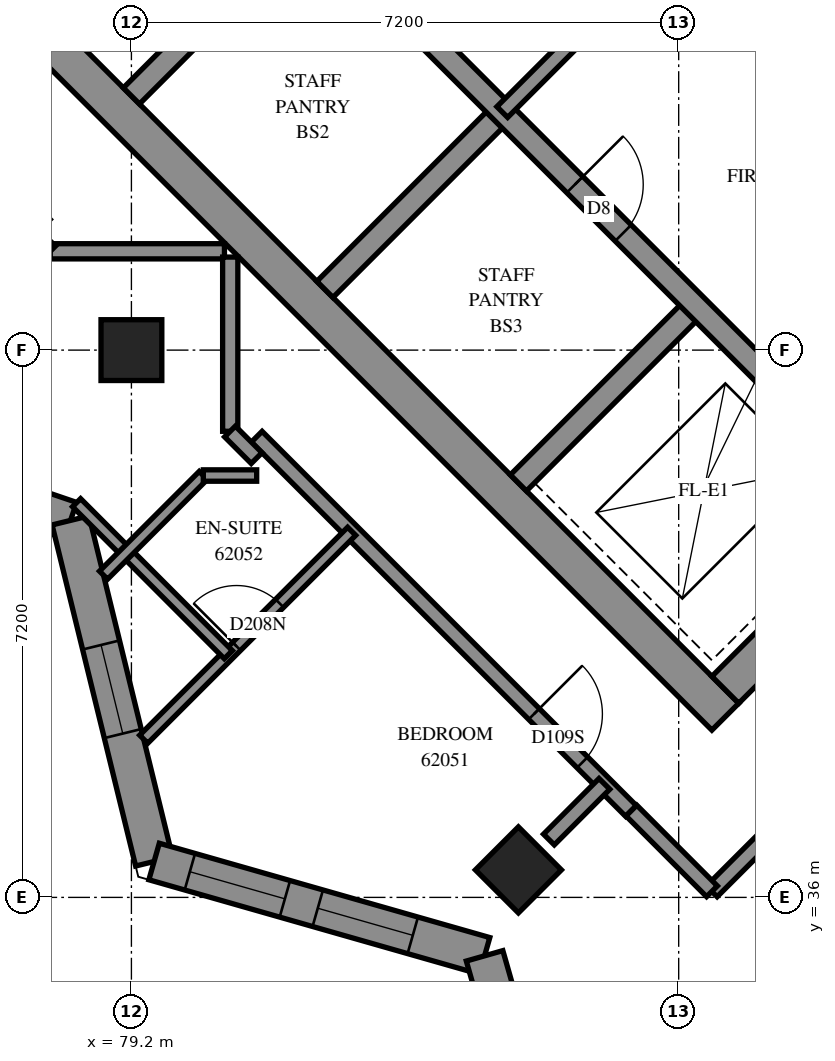
"""IFC4 building model, lengths in metres.
Left out: names, types, materials, properties, quantities, classifications, styles, units other than length and angle.
Written with IfcOpenShell. Run it as: python <this file> out.ifc"""

import sys

from ifc_helpers import new_model, si_unit, direction, frame, frame_2d, origin, origin_2d, place, context, subcontext, project, spatial, polyline, rectangle, outline, extrude, element, fill, save


model = new_model("IFC4")
c1 = context("Model", 3, precision=1e-05, world=origin(), true_north=direction((0.0, 1.0)))
c2 = subcontext(c1, "Body", "Model", "MODEL_VIEW")
j1 = project(units=[si_unit("LENGTHUNIT", "METRE"), si_unit("PLANEANGLEUNIT", "RADIAN")], contexts=[c1])
p1 = place(None, origin())
s1 = spatial("IfcSite", under=j1, at=p1, CompositionType="ELEMENT")
p2 = place(p1, origin())
s2 = spatial("IfcBuilding", under=s1, at=p2, CompositionType="ELEMENT")
p3 = place(p2, frame((0.0, 0.0, 227.0)))
s3 = spatial("IfcBuildingStorey", under=s2, at=p3, CompositionType="ELEMENT", Elevation=227.0)
for number, where, z_axis, x_axis in (
    (1, (79.2, 43.2, 0.0), (0.0, 0.0, 1.0), (1.0, 0.0, 0.0)),
    (2, (84.291, 36.362, 0.0), (0.0, 0.0, 1.0), (0.707, -0.707, 0.0)),
):
    element("IfcColumn", number, at=place(p3, frame(where, z_axis=z_axis, x_axis=x_axis)), inside=s3, PredefinedType="COLUMN", context=c2, shape_type="SweptSolid", body=[
        extrude(rectangle(XDim=0.8, YDim=0.8, at=origin_2d()), origin(), (0.0, 0.0, 1.0), 3.1),
    ])
p4 = place(p3, frame((76.124, 49.267, -0.3), z_axis=(0.0, 0.0, 1.0), x_axis=(0.7071067812, -0.7071067812, 0.0)))
e3 = element("IfcWall", 3, at=p4, inside=s3, PredefinedType="SHEAR", context=c2, shape_type="SweptSolid", body=[
    extrude(rectangle(XDim=15.4, YDim=0.5, at=frame_2d((7.7, 0.0))), origin(), (0.0, 0.0, 1.0), 2.7),
])
p5 = place(p3, frame((87.013, 38.731, -0.3), z_axis=(0.0, 0.0, 1.0), x_axis=(0.7071067812, 0.7071067812, 0.0)))
e4 = element("IfcWall", 4, at=p5, inside=s3, PredefinedType="SHEAR", context=c2, shape_type="SweptSolid", body=[
    extrude(rectangle(XDim=14.4, YDim=0.5, at=frame_2d((7.2, 0.0))), origin(), (0.0, 0.0, 1.0), 2.7),
])
p6 = place(p5, frame((4.55, 0.0, 0.3)))
e5 = element("IfcOpeningElement", 5, at=p6, cuts=e4, PredefinedType="OPENING", context=c2, shape_type="SweptSolid", body=[
    extrude(rectangle(XDim=1.1, YDim=2.1, at=frame_2d((0.55, 1.05))), frame((0.0, 0.26, 0.0), z_axis=(0.0, -1.0, 0.0), x_axis=(1.0, 0.0, 0.0)), (0.0, 0.0, 1.0), 0.52),
])
p7 = place(p5, frame((11.35, 0.0, 0.3)))
e6 = element("IfcOpeningElement", 6, at=p7, cuts=e4, PredefinedType="OPENING", context=c2, shape_type="SweptSolid", body=[
    extrude(rectangle(XDim=1.1, YDim=2.1, at=frame_2d((0.55, 1.05))), frame((0.0, 0.26, 0.0), z_axis=(0.0, -1.0, 0.0), x_axis=(1.0, 0.0, 0.0)), (0.0, 0.0, 1.0), 0.52),
])
p8 = place(p3, frame((79.2, 46.544, 0.0), z_axis=(0.0, 0.0, 1.0), x_axis=(0.7071219326, 0.7070916295, 0.0)))
e7 = element("IfcWall", 7, at=p8, inside=s3, PredefinedType="SOLIDWALL", context=c2, shape_type="SweptSolid", body=[
    extrude(rectangle(XDim=3.3, YDim=0.3, at=frame_2d((1.65, 0.0))), origin(), (0.0, 0.0, 1.0), 3.1),
])
for number, where, z_axis, x_axis in (
    (8, (81.746, 43.999, 0.0), (0.0, 0.0, 1.0), (0.707, 0.707, 0.0)),
    (9, (84.291, 41.453, 0.0), (0.0, 0.0, 1.0), (0.707, 0.707, 0.0)),
):
    element("IfcWall", number, at=place(p3, frame(where, z_axis=z_axis, x_axis=x_axis)), inside=s3, PredefinedType="SOLIDWALL", context=c2, shape_type="SweptSolid", body=[
        extrude(rectangle(XDim=3.3, YDim=0.3, at=frame_2d((1.65, 0.0))), origin(), (0.0, 0.0, 1.0), 3.1),
    ])
p9 = place(p3, frame((78.988, 51.423, 0.0), z_axis=(0.0, 0.0, 1.0), x_axis=(0.7071067812, -0.7071067812, 0.0)))
e10 = element("IfcWall", 10, at=p9, inside=s3, PredefinedType="SOLIDWALL", context=c2, shape_type="SweptSolid", body=[
    extrude(rectangle(XDim=14.4, YDim=0.3, at=frame_2d((7.2, 0.0))), origin(), (0.0, 0.0, 1.0), 3.1),
])
p10 = place(p9, frame((1.35, 0.0, 0.0)))
e11 = element("IfcOpeningElement", 11, at=p10, cuts=e10, PredefinedType="OPENING", context=c2, shape_type="SweptSolid", body=[
    extrude(rectangle(XDim=0.9, YDim=2.1, at=frame_2d((0.45, 1.05))), frame((0.0, 0.16, 0.0), z_axis=(0.0, -1.0, 0.0), x_axis=(1.0, 0.0, 0.0)), (0.0, 0.0, 1.0), 0.32),
])
p11 = place(p9, frame((4.95, 0.0, 0.0)))
e12 = element("IfcOpeningElement", 12, at=p11, cuts=e10, PredefinedType="OPENING", context=c2, shape_type="SweptSolid", body=[
    extrude(rectangle(XDim=0.9, YDim=2.1, at=frame_2d((0.45, 1.05))), frame((0.0, 0.16, 0.0), z_axis=(0.0, -1.0, 0.0), x_axis=(1.0, 0.0, 0.0)), (0.0, 0.0, 1.0), 0.32),
])
p12 = place(p9, frame((8.55, 0.0, 0.0)))
e13 = element("IfcOpeningElement", 13, at=p12, cuts=e10, PredefinedType="OPENING", context=c2, shape_type="SweptSolid", body=[
    extrude(rectangle(XDim=0.9, YDim=2.1, at=frame_2d((0.45, 1.05))), frame((0.0, 0.16, 0.0), z_axis=(0.0, -1.0, 0.0), x_axis=(1.0, 0.0, 0.0)), (0.0, 0.0, 1.0), 0.32),
])
p13 = place(p9, frame((12.05, 0.0, 0.0)))
e14 = element("IfcOpeningElement", 14, at=p13, cuts=e10, PredefinedType="OPENING", context=c2, shape_type="SweptSolid", body=[
    extrude(rectangle(XDim=1.1, YDim=2.1, at=frame_2d((0.55, 1.05))), frame((0.0, 0.16, 0.0), z_axis=(0.0, -1.0, 0.0), x_axis=(1.0, 0.0, 0.0)), (0.0, 0.0, 1.0), 0.32),
])
p14 = place(p3, frame((81.534, 53.969, 0.0), z_axis=(0.0, 0.0, 1.0), x_axis=(0.707103309, -0.7071102534, 0.0)))
e15 = element("IfcWall", 15, at=p14, inside=s3, PredefinedType="SOLIDWALL", context=c2, shape_type="SweptSolid", body=[
    extrude(rectangle(XDim=14.4, YDim=0.3, at=frame_2d((7.2, 0.0))), origin(), (0.0, 0.0, 1.0), 3.1),
])
p15 = place(p14, frame((1.25, 0.0, 0.0)))
e16 = element("IfcOpeningElement", 16, at=p15, cuts=e15, PredefinedType="OPENING", context=c2, shape_type="SweptSolid", body=[
    extrude(rectangle(XDim=1.1, YDim=2.1, at=frame_2d((0.55, 1.05))), frame((0.0, 0.16, 0.0), z_axis=(0.0, -1.0, 0.0), x_axis=(1.0, 0.0, 0.0)), (0.0, 0.0, 1.0), 0.32),
])
p16 = place(p14, frame((4.85, 0.0, 0.0)))
e17 = element("IfcOpeningElement", 17, at=p16, cuts=e15, PredefinedType="OPENING", context=c2, shape_type="SweptSolid", body=[
    extrude(rectangle(XDim=1.1, YDim=2.1, at=frame_2d((0.55, 1.05))), frame((0.0, 0.16, 0.0), z_axis=(0.0, -1.0, 0.0), x_axis=(1.0, 0.0, 0.0)), (0.0, 0.0, 1.0), 0.32),
])
p17 = place(p14, frame((8.45, 0.0, 0.0)))
e18 = element("IfcOpeningElement", 18, at=p17, cuts=e15, PredefinedType="OPENING", context=c2, shape_type="SweptSolid", body=[
    extrude(rectangle(XDim=1.1, YDim=2.1, at=frame_2d((0.55, 1.05))), frame((0.0, 0.16, 0.0), z_axis=(0.0, -1.0, 0.0), x_axis=(1.0, 0.0, 0.0)), (0.0, 0.0, 1.0), 0.32),
])
p18 = place(p14, frame((12.05, 0.0, 0.0)))
e19 = element("IfcOpeningElement", 19, at=p18, cuts=e15, PredefinedType="OPENING", context=c2, shape_type="SweptSolid", body=[
    extrude(rectangle(XDim=1.1, YDim=2.1, at=frame_2d((0.55, 1.05))), frame((0.0, 0.16, 0.0), z_axis=(0.0, -1.0, 0.0), x_axis=(1.0, 0.0, 0.0)), (0.0, 0.0, 1.0), 0.32),
])
p19 = place(p3, frame((74.585, 42.257, 0.0), z_axis=(0.0, 0.0, 1.0), x_axis=(0.9466888904, -0.3221492585, 0.0)))
e20 = element("IfcWall", 20, at=p19, inside=s3, PredefinedType="SOLIDWALL", context=c2, shape_type="SweptSolid", body=[
    extrude(outline(polyline([(0.064, -0.25), (3.892, -0.25), (4.166, 0.25), (-0.064, 0.25), (0.064, -0.25)])), origin(), (0.0, 0.0, 1.0), 3.1),
])
p20 = place(p19, frame((1.7, 0.0, 0.45)))
e21 = element("IfcOpeningElement", 21, at=p20, cuts=e20, PredefinedType="OPENING", context=c2, shape_type="SweptSolid", body=[
    extrude(rectangle(XDim=1.2, YDim=2.5, at=frame_2d((0.6, 1.25))), frame((0.0, 0.26, 0.0), z_axis=(0.0, -1.0, 0.0), x_axis=(1.0, 0.0, 0.0)), (0.0, 0.0, 1.0), 0.52),
])
p21 = place(p3, frame((78.399, 40.959, 0.0), z_axis=(0.0, 0.0, 1.0), x_axis=(0.2379595757, -0.9712750591, 0.0)))
e22 = element("IfcWall", 22, at=p21, inside=s3, PredefinedType="SOLIDWALL", context=c2, shape_type="SweptSolid", body=[
    extrude(outline(polyline([(0.137, -0.25), (4.765, -0.25), (4.475, 0.25), (-0.137, 0.25), (0.137, -0.25)])), origin(), (0.0, 0.0, 1.0), 3.1),
])
p22 = place(p21, frame((1.687, 0.0, 0.45)))
e23 = element("IfcOpeningElement", 23, at=p22, cuts=e22, PredefinedType="OPENING", context=c2, shape_type="SweptSolid", body=[
    extrude(rectangle(XDim=1.2, YDim=2.5, at=frame_2d((0.6, 1.25))), frame((0.0, 0.26, 0.0), z_axis=(0.0, -1.0, 0.0), x_axis=(1.0, 0.0, 0.0)), (0.0, 0.0, 1.0), 0.52),
])
p23 = place(p3, frame((79.499, 36.472, 0.0), z_axis=(0.0, 0.0, 1.0), x_axis=(0.9615973563, -0.2744640675, 0.0)))
e24 = element("IfcWall", 24, at=p23, inside=s3, PredefinedType="SOLIDWALL", context=c2, shape_type="SweptSolid", body=[
    extrude(outline(polyline([(-0.145, -0.25), (4.383, -0.25), (4.661, 0.25), (0.145, 0.25), (-0.145, -0.25)])), origin(), (0.0, 0.0, 1.0), 3.1),
])
p24 = place(p23, frame((0.489, 0.0, 0.45)))
e25 = element("IfcOpeningElement", 25, at=p24, cuts=e24, PredefinedType="OPENING", context=c2, shape_type="SweptSolid", body=[
    extrude(rectangle(XDim=1.3, YDim=2.5, at=frame_2d((0.65, 1.25))), frame((0.0, 0.26, 0.0), z_axis=(0.0, -1.0, 0.0), x_axis=(1.0, 0.0, 0.0)), (0.0, 0.0, 1.0), 0.52),
])
p25 = place(p23, frame((2.239, 0.0, 0.45)))
e26 = element("IfcOpeningElement", 26, at=p25, cuts=e24, PredefinedType="OPENING", context=c2, shape_type="SweptSolid", body=[
    extrude(rectangle(XDim=1.3, YDim=2.5, at=frame_2d((0.65, 1.25))), frame((0.0, 0.26, 0.0), z_axis=(0.0, -1.0, 0.0), x_axis=(1.0, 0.0, 0.0)), (0.0, 0.0, 1.0), 0.52),
])
p26 = place(p3, frame((83.846, 35.231, 0.0), z_axis=(0.0, 0.0, 1.0), x_axis=(0.2744640675, -0.9615973563, 0.0)))
e27 = element("IfcWall", 27, at=p26, inside=s3, PredefinedType="SOLIDWALL", context=c2, shape_type="SweptSolid", body=[
    extrude(outline(polyline([(0.139, -0.25), (4.667, -0.25), (4.376, 0.25), (-0.139, 0.25), (0.139, -0.25)])), origin(), (0.0, 0.0, 1.0), 3.1),
])
p27 = place(p26, frame((0.972, 0.0, 0.45)))
e28 = element("IfcOpeningElement", 28, at=p27, cuts=e27, PredefinedType="OPENING", context=c2, shape_type="SweptSolid", body=[
    extrude(rectangle(XDim=1.2, YDim=2.5, at=frame_2d((0.6, 1.25))), frame((0.0, 0.26, 0.0), z_axis=(0.0, -1.0, 0.0), x_axis=(1.0, 0.0, 0.0)), (0.0, 0.0, 1.0), 0.52),
])
p28 = place(p3, frame((84.079, 46.332, 0.0), z_axis=(0.0, 0.0, 1.0), x_axis=(0.7071067812, 0.7071067812, 0.0)))
e29 = element("IfcWall", 29, at=p28, inside=s3, PredefinedType="PARTITIONING", context=c2, shape_type="SweptSolid", body=[
    extrude(rectangle(XDim=3.6, YDim=0.2, at=frame_2d((1.8, 0.0))), origin(), (0.0, 0.0, 1.0), 3.1),
])
p29 = place(p3, frame((85.026, 32.008, 0.0), z_axis=(0.0, 0.0, 1.0), x_axis=(0.7071030933, 0.707110469, 0.0)))
e30 = element("IfcWall", 30, at=p29, inside=s3, PredefinedType="PARTITIONING", context=c2, shape_type="SweptSolid", body=[
    extrude(rectangle(XDim=13.558, YDim=0.2, at=frame_2d((6.779, 0.0))), origin(), (0.0, 0.0, 1.0), 3.1),
])
p30 = place(p3, frame((86.835, 36.079, 0.0), z_axis=(0.0, 0.0, 1.0), x_axis=(0.7071067812, 0.7071067812, 0.0)))
e31 = element("IfcWall", 31, at=p30, inside=s3, PredefinedType="PARTITIONING", context=c2, shape_type="SweptSolid", body=[
    extrude(rectangle(XDim=9.402, YDim=0.2, at=frame_2d((4.701, 0.0))), origin(), (0.0, 0.0, 1.0), 3.1),
])
p31 = place(p3, frame((80.849, 42.061, 0.0), z_axis=(0.0, 0.0, 1.0), x_axis=(0.7071067812, -0.7071067812, 0.0)))
e32 = element("IfcWall", 32, at=p31, inside=s3, PredefinedType="PARTITIONING", context=c2, shape_type="SweptSolid", body=[
    extrude(rectangle(XDim=6.964, YDim=0.2, at=frame_2d((3.482, 0.0))), origin(), (0.0, 0.0, 1.0), 3.1),
])
p32 = place(p31, frame((5.159, 0.0, 0.0)))
e33 = element("IfcOpeningElement", 33, at=p32, cuts=e32, PredefinedType="OPENING", context=c2, shape_type="SweptSolid", body=[
    extrude(rectangle(XDim=0.9, YDim=2.1, at=frame_2d((0.45, 1.05))), frame((0.0, 0.11, 0.0), z_axis=(0.0, -1.0, 0.0), x_axis=(1.0, 0.0, 0.0)), (0.0, 0.0, 1.0), 0.22),
])
p33 = place(p3, frame((79.362, 38.081, 0.0), z_axis=(0.0, 0.0, 1.0), x_axis=(0.7071067812, 0.7071067812, 0.0)))
e34 = element("IfcWall", 34, at=p33, inside=s3, PredefinedType="PARTITIONING", context=c2, shape_type="SweptSolid", body=[
    extrude(rectangle(XDim=3.869, YDim=0.15, at=frame_2d((1.935, 0.0))), origin(), (0.0, 0.0, 1.0), 3.1),
])
p34 = place(p33, frame((1.728, 0.0, 0.0)))
e35 = element("IfcOpeningElement", 35, at=p34, cuts=e34, PredefinedType="OPENING", context=c2, shape_type="SweptSolid", body=[
    extrude(rectangle(XDim=0.8, YDim=2.1, at=frame_2d((0.4, 1.05))), frame((0.0, 0.085, 0.0), z_axis=(0.0, -1.0, 0.0), x_axis=(1.0, 0.0, 0.0)), (0.0, 0.0, 1.0), 0.17),
])
p35 = place(p3, frame((78.478, 41.193, 0.0), z_axis=(0.0, 0.0, 1.0), x_axis=(0.7065934681, -0.7076197219, 0.0)))
e36 = element("IfcWall", 36, at=p35, inside=s3, PredefinedType="PARTITIONING", context=c2, shape_type="SweptSolid", body=[
    extrude(rectangle(XDim=2.826, YDim=0.15, at=frame_2d((1.413, 0.0))), origin(), (0.0, 0.0, 1.0), 3.1),
])
for number, where, z_axis, x_axis in (
    (37, (78.132, 44.5, 0.0), (0.0, 0.0, 1.0), (1.0, 0.0, 0.0)),
    (38, (80.5, 42.132, 0.0), (0.0, 0.0, 1.0), (0.0, 1.0, 0.0)),
):
    element("IfcWall", number, at=place(p3, frame(where, z_axis=z_axis, x_axis=x_axis)), inside=s3, PredefinedType="PARTITIONING", context=c2, shape_type="SweptSolid", body=[
        extrude(rectangle(XDim=2.292, YDim=0.2, at=frame_2d((1.146, 0.0))), origin(), (0.0, 0.0, 1.0), 3.1),
    ])
p36 = place(p3, frame((78.833, 40.239, 0.0), z_axis=(0.0, 0.0, 1.0), x_axis=(0.707079832, 0.7071337294, 0.0)))
e39 = element("IfcWall", 39, at=p36, inside=s3, PredefinedType="PARTITIONING", context=c2, shape_type="SweptSolid", body=[
    extrude(rectangle(XDim=1.855, YDim=0.15, at=frame_2d((0.928, 0.0))), origin(), (0.0, 0.0, 1.0), 3.1),
])
p37 = place(p3, frame((85.778, 37.142, 0.0), z_axis=(0.0, 0.0, 1.0), x_axis=(0.7064400143, -0.70777292, 0.0)))
e40 = element("IfcWall", 40, at=p37, inside=s3, PredefinedType="PARTITIONING", context=c2, shape_type="SweptSolid", body=[
    extrude(rectangle(XDim=1.5, YDim=0.2, at=frame_2d((0.75, 0.0))), origin(), (0.0, 0.0, 1.0), 3.1),
])
p38 = place(p3, frame((84.693, 36.761, 0.0), z_axis=(0.0, 0.0, 1.0), x_axis=(0.7061388061, 0.708073433, 0.0)))
e41 = element("IfcWall", 41, at=p38, inside=s3, PredefinedType="PARTITIONING", context=c2, shape_type="SweptSolid", body=[
    extrude(rectangle(XDim=1.034, YDim=0.2, at=frame_2d((0.517, 0.0))), origin(), (0.0, 0.0, 1.0), 3.1),
])
p39 = place(p3, frame((80.146, 41.55, 0.0), z_axis=(0.0, 0.0, 1.0), x_axis=(1.0, 0.0, 0.0)))
e42 = element("IfcWall", 42, at=p39, inside=s3, PredefinedType="PARTITIONING", context=c2, shape_type="SweptSolid", body=[
    extrude(rectangle(XDim=0.702, YDim=0.15, at=frame_2d((0.351, 0.0))), origin(), (0.0, 0.0, 1.0), 3.1),
])
for number, where, z_axis, x_axis in (
    (43, (77.779, 44.847, 0.0), (0.0, 0.0, 1.0), (0.707, -0.707, 0.0)),
    (44, (80.497, 42.129, 0.0), (0.0, 0.0, 1.0), (0.707, -0.707, 0.0)),
):
    element("IfcWall", number, at=place(p3, frame(where, z_axis=z_axis, x_axis=x_axis)), inside=s3, PredefinedType="PARTITIONING", context=c2, shape_type="SweptSolid", body=[
        extrude(rectangle(XDim=0.495, YDim=0.2, at=frame_2d((0.247, 0.0))), origin(), (0.0, 0.0, 1.0), 3.1),
    ])
p40 = place(p22, origin())
e45 = element("IfcWindow", 45, at=p40, inside=s3, PartitioningType="SINGLE_PANEL", PredefinedType="WINDOW", context=c2, shape_type="SweptSolid", body=[
    extrude(rectangle(XDim=1.2, YDim=2.5, at=frame_2d((0.6, 1.25))), frame((0.0, 0.18, 0.0), z_axis=(0.0, -1.0, 0.0), x_axis=(1.0, 0.0, 0.0)), (0.0, 0.0, 1.0), 0.06),
])
fill(e23, e45)
p41 = place(p24, origin())
e46 = element("IfcWindow", 46, at=p41, inside=s3, PartitioningType="SINGLE_PANEL", PredefinedType="WINDOW", context=c2, shape_type="SweptSolid", body=[
    extrude(rectangle(XDim=1.3, YDim=2.5, at=frame_2d((0.65, 1.25))), frame((0.0, 0.18, 0.0), z_axis=(0.0, -1.0, 0.0), x_axis=(1.0, 0.0, 0.0)), (0.0, 0.0, 1.0), 0.06),
])
fill(e25, e46)
p42 = place(p25, origin())
e47 = element("IfcWindow", 47, at=p42, inside=s3, PartitioningType="SINGLE_PANEL", PredefinedType="WINDOW", context=c2, shape_type="SweptSolid", body=[
    extrude(rectangle(XDim=1.3, YDim=2.5, at=frame_2d((0.65, 1.25))), frame((0.0, 0.18, 0.0), z_axis=(0.0, -1.0, 0.0), x_axis=(1.0, 0.0, 0.0)), (0.0, 0.0, 1.0), 0.06),
])
fill(e26, e47)
p43 = place(p12, origin())
e48 = element("IfcDoor", 48, at=p43, inside=s3, OperationType="SINGLE_SWING_LEFT", PredefinedType="DOOR", context=c2, shape_type="SweptSolid", body=[
    extrude(rectangle(XDim=0.9, YDim=2.1, at=frame_2d((0.45, 1.05))), frame((0.0, 0.025, 0.0), z_axis=(0.0, -1.0, 0.0), x_axis=(1.0, 0.0, 0.0)), (0.0, 0.0, 1.0), 0.05),
])
fill(e13, e48)
p44 = place(p32, origin())
e49 = element("IfcDoor", 49, at=p44, inside=s3, OperationType="SINGLE_SWING_RIGHT", PredefinedType="DOOR", context=c2, shape_type="SweptSolid", body=[
    extrude(rectangle(XDim=0.9, YDim=2.1, at=frame_2d((0.45, 1.05))), frame((0.0, 0.025, 0.0), z_axis=(0.0, -1.0, 0.0), x_axis=(1.0, 0.0, 0.0)), (0.0, 0.0, 1.0), 0.05),
])
fill(e33, e49)
p45 = place(p34, origin())
e50 = element("IfcDoor", 50, at=p45, inside=s3, OperationType="SINGLE_SWING_RIGHT", PredefinedType="DOOR", context=c2, shape_type="SweptSolid", body=[
    extrude(rectangle(XDim=0.8, YDim=2.1, at=frame_2d((0.4, 1.05))), frame((0.0, 0.025, 0.0), z_axis=(0.0, -1.0, 0.0), x_axis=(1.0, 0.0, 0.0)), (0.0, 0.0, 1.0), 0.05),
])
fill(e35, e50)
save(model, sys.argv[1])
